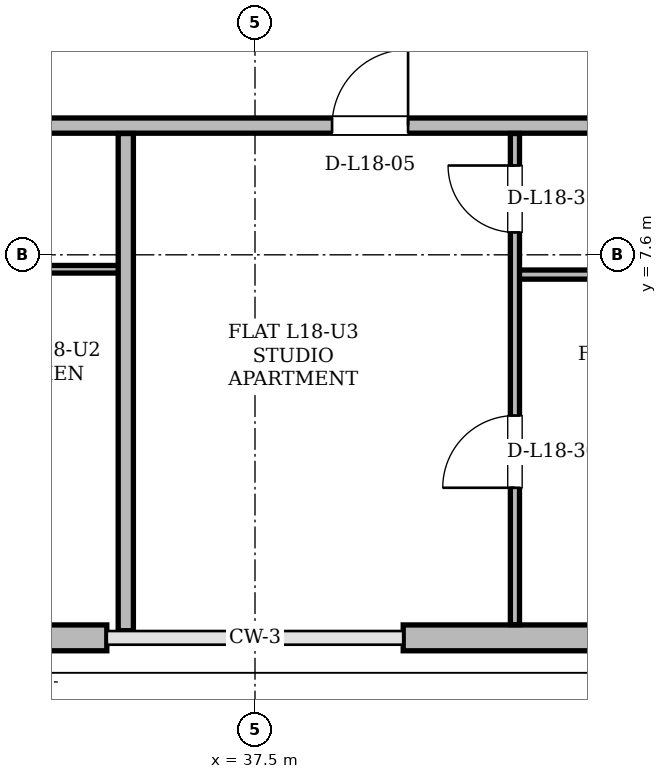
"""IFC4 building model, lengths in metres.
Left out: names, types, materials, properties, quantities, classifications, styles, units other than length and angle.
Written with IfcOpenShell. Run it as: python <this file> out.ifc"""

import sys

from ifc_helpers import new_model, si_unit, direction, frame, frame_2d, origin, place, context, subcontext, project, spatial, rectangle, extrude, element, fill, save


model = new_model("IFC4")
c1 = context("Model", 3, precision=1e-05, world=origin(), true_north=direction((0.0, 1.0)))
c2 = subcontext(c1, "Body", "Model", "MODEL_VIEW")
j1 = project(units=[si_unit("LENGTHUNIT", "METRE"), si_unit("PLANEANGLEUNIT", "RADIAN")], contexts=[c1])
p1 = place(None, origin())
s1 = spatial("IfcSite", under=j1, at=p1, CompositionType="ELEMENT")
p2 = place(p1, origin())
s2 = spatial("IfcBuilding", under=s1, at=p2, CompositionType="ELEMENT")
p3 = place(p2, frame((0.0, 0.0, 70.5)))
s3 = spatial("IfcBuildingStorey", under=s2, at=p3, CompositionType="ELEMENT", Elevation=70.5)
p4 = place(p3, frame((20.574, 2.561, 0.0), z_axis=(0.0, 0.0, 1.0), x_axis=(1.0, 0.0, 0.0)))
e1 = element("IfcWall", 1, at=p4, inside=s3, PredefinedType="SOLIDWALL", context=c2, shape_type="SweptSolid", body=[
    extrude(rectangle(XDim=14.976, YDim=0.34, at=frame_2d((7.488, 0.0))), origin(), (0.0, 0.0, 1.0), 2.494),
])
p5 = place(p4, frame((7.0, 0.0, 0.0)))
e2 = element("IfcOpeningElement", 2, at=p5, cuts=e1, PredefinedType="OPENING", context=c2, shape_type="SweptSolid", body=[
    extrude(rectangle(XDim=1.5, YDim=2.2, at=frame_2d((0.75, 1.1))), frame((0.0, 0.17, 0.0), z_axis=(0.0, -1.0, 0.0), x_axis=(1.0, 0.0, 0.0)), (0.0, 0.0, 1.0), 0.34),
])
p6 = place(p4, frame((1.149, 0.0, 0.85)))
e3 = element("IfcOpeningElement", 3, at=p6, cuts=e1, PredefinedType="OPENING", context=c2, shape_type="SweptSolid", body=[
    extrude(rectangle(XDim=2.0, YDim=1.534, at=frame_2d((1.0, 0.767))), frame((0.0, 0.17, 0.0), z_axis=(0.0, -1.0, 0.0), x_axis=(1.0, 0.0, 0.0)), (0.0, 0.0, 1.0), 0.34),
])
p7 = place(p4, frame((10.865, 0.0, 0.85)))
e4 = element("IfcOpeningElement", 4, at=p7, cuts=e1, PredefinedType="OPENING", context=c2, shape_type="SweptSolid", body=[
    extrude(rectangle(XDim=1.2, YDim=1.48, at=frame_2d((0.6, 0.74))), frame((0.0, 0.17, 0.0), z_axis=(0.0, -1.0, 0.0), x_axis=(1.0, 0.0, 0.0)), (0.0, 0.0, 1.0), 0.34),
])
p8 = place(p4, frame((12.593, 0.0, 0.85)))
e5 = element("IfcOpeningElement", 5, at=p8, cuts=e1, PredefinedType="OPENING", context=c2, shape_type="SweptSolid", body=[
    extrude(rectangle(XDim=1.4, YDim=1.534, at=frame_2d((0.7, 0.767))), frame((0.0, 0.17, 0.0), z_axis=(0.0, -1.0, 0.0), x_axis=(1.0, 0.0, 0.0)), (0.0, 0.0, 1.0), 0.34),
])
p9 = place(p3, frame((39.45, 2.561, 0.0), z_axis=(0.0, 0.0, 1.0), x_axis=(1.0, 0.0, 0.0)))
e6 = element("IfcWall", 6, at=p9, inside=s3, PredefinedType="SOLIDWALL", context=c2, shape_type="SweptSolid", body=[
    extrude(rectangle(XDim=14.976, YDim=0.34, at=frame_2d((7.488, 0.0))), origin(), (0.0, 0.0, 1.0), 2.494),
])
p10 = place(p9, frame((5.651, 0.0, 0.0)))
e7 = element("IfcOpeningElement", 7, at=p10, cuts=e6, PredefinedType="OPENING", context=c2, shape_type="SweptSolid", body=[
    extrude(rectangle(XDim=1.5, YDim=2.2, at=frame_2d((0.75, 1.1))), frame((0.0, 0.17, 0.0), z_axis=(0.0, -1.0, 0.0), x_axis=(1.0, 0.0, 0.0)), (0.0, 0.0, 1.0), 0.34),
])
p11 = place(p9, frame((10.301, 0.0, 0.85)))
e8 = element("IfcOpeningElement", 8, at=p11, cuts=e6, PredefinedType="OPENING", context=c2, shape_type="SweptSolid", body=[
    extrude(rectangle(XDim=1.2, YDim=1.48, at=frame_2d((0.6, 0.74))), frame((0.0, 0.17, 0.0), z_axis=(0.0, -1.0, 0.0), x_axis=(1.0, 0.0, 0.0)), (0.0, 0.0, 1.0), 0.34),
])
p12 = place(p9, frame((12.8, 0.0, 0.85)))
e9 = element("IfcOpeningElement", 9, at=p12, cuts=e6, PredefinedType="OPENING", context=c2, shape_type="SweptSolid", body=[
    extrude(rectangle(XDim=1.2, YDim=1.48, at=frame_2d((0.6, 0.74))), frame((0.0, 0.17, 0.0), z_axis=(0.0, -1.0, 0.0), x_axis=(1.0, 0.0, 0.0)), (0.0, 0.0, 1.0), 0.34),
])
p13 = place(p3, frame((40.92, 7.34, 0.0), z_axis=(0.0, 0.0, 1.0), x_axis=(1.0, 0.0, 0.0)))
e10 = element("IfcWall", 10, at=p13, inside=s3, PredefinedType="PARTITIONING", context=c2, shape_type="SweptSolid", body=[
    extrude(rectangle(XDim=2.93, YDim=0.12, at=frame_2d((1.465, 0.0))), origin(), (0.0, 0.0, 1.0), 2.946),
])
p14 = place(p3, frame((32.92, 7.41, 0.0), z_axis=(0.0, 0.0, 1.0), x_axis=(1.0, 0.0, 0.0)))
e11 = element("IfcWall", 11, at=p14, inside=s3, PredefinedType="PARTITIONING", context=c2, shape_type="SweptSolid", body=[
    extrude(rectangle(XDim=2.93, YDim=0.1, at=frame_2d((1.465, 0.0))), origin(), (0.0, 0.0, 1.0), 3.36),
])
p15 = place(p3, frame((19.2, 9.3, 0.0), z_axis=(0.0, 0.0, 1.0), x_axis=(1.0, 0.0, 0.0)))
e12 = element("IfcWall", 12, at=p15, inside=s3, PredefinedType="PARTITIONING", context=c2, shape_type="SweptSolid", body=[
    extrude(rectangle(XDim=36.6, YDim=0.2, at=frame_2d((18.3, 0.0))), origin(), (0.0, 0.0, 1.0), 2.738),
])
p16 = place(p15, frame((1.633, 0.0, 0.0)))
e13 = element("IfcOpeningElement", 13, at=p16, cuts=e12, PredefinedType="OPENING", context=c2, shape_type="SweptSolid", body=[
    extrude(rectangle(XDim=1.0, YDim=2.18, at=frame_2d((0.5, 1.09))), frame((0.0, 0.1, 0.0), z_axis=(0.0, -1.0, 0.0), x_axis=(1.0, 0.0, 0.0)), (0.0, 0.0, 1.0), 0.2),
])
p17 = place(p15, frame((10.733, 0.0, 0.0)))
e14 = element("IfcOpeningElement", 14, at=p17, cuts=e12, PredefinedType="OPENING", context=c2, shape_type="SweptSolid", body=[
    extrude(rectangle(XDim=1.0, YDim=2.18, at=frame_2d((0.5, 1.09))), frame((0.0, 0.1, 0.0), z_axis=(0.0, -1.0, 0.0), x_axis=(1.0, 0.0, 0.0)), (0.0, 0.0, 1.0), 0.2),
])
p18 = place(p15, frame((19.314, 0.0, 0.0)))
e15 = element("IfcOpeningElement", 15, at=p18, cuts=e12, PredefinedType="OPENING", context=c2, shape_type="SweptSolid", body=[
    extrude(rectangle(XDim=1.0, YDim=2.18, at=frame_2d((0.5, 1.09))), frame((0.0, 0.1, 0.0), z_axis=(0.0, -1.0, 0.0), x_axis=(1.0, 0.0, 0.0)), (0.0, 0.0, 1.0), 0.2),
])
p19 = place(p15, frame((28.985, 0.0, 0.0)))
e16 = element("IfcOpeningElement", 16, at=p19, cuts=e12, PredefinedType="OPENING", context=c2, shape_type="SweptSolid", body=[
    extrude(rectangle(XDim=1.0, YDim=2.18, at=frame_2d((0.5, 1.09))), frame((0.0, 0.1, 0.0), z_axis=(0.0, -1.0, 0.0), x_axis=(1.0, 0.0, 0.0)), (0.0, 0.0, 1.0), 0.2),
])
p20 = place(p15, frame((33.856, 0.0, 0.0)))
e17 = element("IfcOpeningElement", 17, at=p20, cuts=e12, PredefinedType="OPENING", context=c2, shape_type="SweptSolid", body=[
    extrude(rectangle(XDim=1.0, YDim=2.18, at=frame_2d((0.5, 1.09))), frame((0.0, 0.1, 0.0), z_axis=(0.0, -1.0, 0.0), x_axis=(1.0, 0.0, 0.0)), (0.0, 0.0, 1.0), 0.2),
])
p21 = place(p3, frame((35.8, 2.655, 0.0), z_axis=(0.0, 0.0, 1.0), x_axis=(0.0, 1.0, 0.0)))
e18 = element("IfcWall", 18, at=p21, inside=s3, PredefinedType="PARTITIONING", context=c2, shape_type="SweptSolid", body=[
    extrude(rectangle(XDim=6.542, YDim=0.2, at=frame_2d((3.271, 0.0))), origin(), (0.0, 0.0, 1.0), 2.494),
])
p22 = place(p3, frame((40.92, 2.735, 0.0), z_axis=(0.0, 0.0, 1.0), x_axis=(0.0, 1.0, 0.0)))
e19 = element("IfcWall", 19, at=p22, inside=s3, PredefinedType="PARTITIONING", context=c2, shape_type="SweptSolid", body=[
    extrude(rectangle(XDim=6.461, YDim=0.12, at=frame_2d((3.231, 0.0))), origin(), (0.0, 0.0, 1.0), 3.36),
])
p23 = place(p22, frame((1.801, 0.0, 0.0)))
e20 = element("IfcOpeningElement", 20, at=p23, cuts=e19, PredefinedType="OPENING", context=c2, shape_type="SweptSolid", body=[
    extrude(rectangle(XDim=0.95, YDim=2.1, at=frame_2d((0.475, 1.05))), frame((0.0, 0.06, 0.0), z_axis=(0.0, -1.0, 0.0), x_axis=(1.0, 0.0, 0.0)), (0.0, 0.0, 1.0), 0.12),
])
p24 = place(p22, frame((5.16, 0.0, 0.0)))
e21 = element("IfcOpeningElement", 21, at=p24, cuts=e19, PredefinedType="OPENING", context=c2, shape_type="SweptSolid", body=[
    extrude(rectangle(XDim=0.88, YDim=2.08, at=frame_2d((0.44, 1.04))), frame((0.0, 0.06, 0.0), z_axis=(0.0, -1.0, 0.0), x_axis=(1.0, 0.0, 0.0)), (0.0, 0.0, 1.0), 0.12),
])
p25 = place(p18, origin())
e22 = element("IfcDoor", 22, at=p25, inside=s3, OperationType="SINGLE_SWING_RIGHT", PredefinedType="DOOR", context=c2, shape_type="SweptSolid", body=[
    extrude(rectangle(XDim=1.0, YDim=2.18, at=frame_2d((0.5, 1.09))), frame((0.0, 0.025, 0.0), z_axis=(0.0, -1.0, 0.0), x_axis=(1.0, 0.0, 0.0)), (0.0, 0.0, 1.0), 0.05),
])
fill(e15, e22)
p26 = place(p23, origin())
e23 = element("IfcDoor", 23, at=p26, inside=s3, OperationType="SINGLE_SWING_LEFT", PredefinedType="DOOR", context=c2, shape_type="SweptSolid", body=[
    extrude(rectangle(XDim=0.95, YDim=2.1, at=frame_2d((0.475, 1.05))), frame((0.0, 0.025, 0.0), z_axis=(0.0, -1.0, 0.0), x_axis=(1.0, 0.0, 0.0)), (0.0, 0.0, 1.0), 0.05),
])
fill(e20, e23)
p27 = place(p24, origin())
e24 = element("IfcDoor", 24, at=p27, inside=s3, OperationType="SINGLE_SWING_RIGHT", PredefinedType="DOOR", context=c2, shape_type="SweptSolid", body=[
    extrude(rectangle(XDim=0.88, YDim=2.08, at=frame_2d((0.44, 1.04))), frame((0.0, 0.025, 0.0), z_axis=(0.0, -1.0, 0.0), x_axis=(1.0, 0.0, 0.0)), (0.0, 0.0, 1.0), 0.05),
])
fill(e21, e24)
save(model, sys.argv[1])
